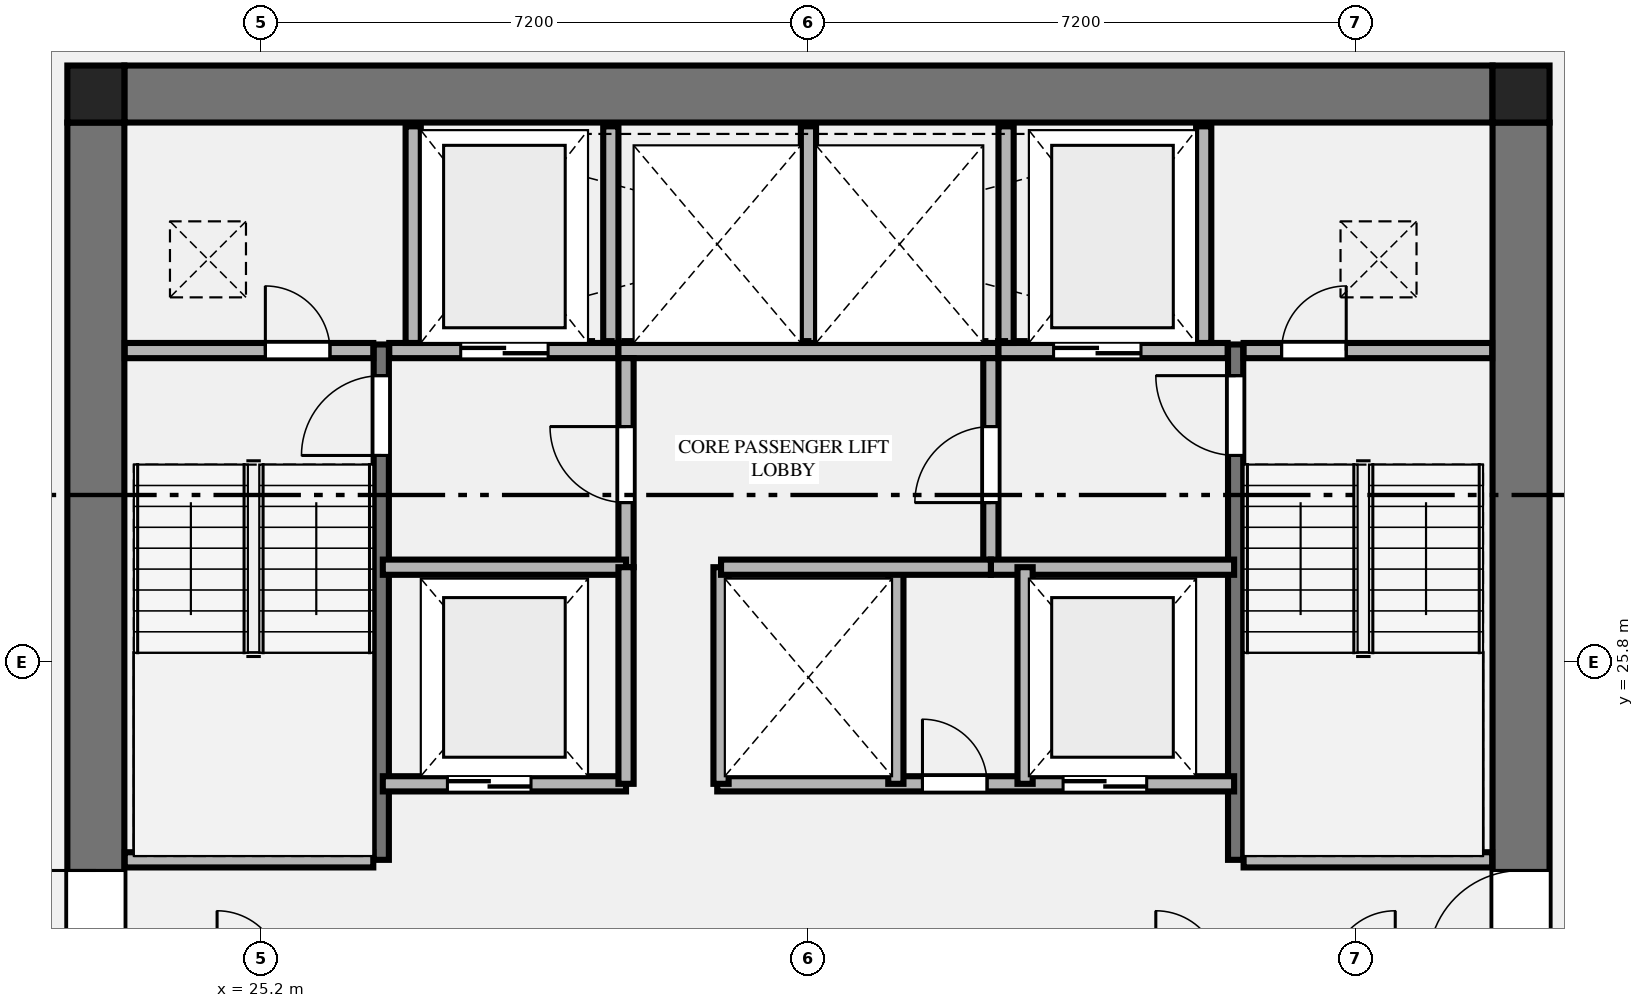
"""IFC4 building model, lengths in metres.
Left out: names, types, materials, properties, quantities, classifications, styles, units other than length and angle.
Written with IfcOpenShell. Run it as: python <this file> out.ifc"""

import sys

from ifc_helpers import new_model, si_unit, direction, frame, frame_2d, origin, origin_2d, place, context, subcontext, project, spatial, rectangle, extrude, element, fill, save


model = new_model("IFC4")
c1 = context("Model", 3, precision=1e-05, world=origin(), true_north=direction((0.0, 1.0)))
c2 = subcontext(c1, "Body", "Model", "MODEL_VIEW")
j1 = project(units=[si_unit("LENGTHUNIT", "METRE"), si_unit("PLANEANGLEUNIT", "RADIAN")], contexts=[c1])
p1 = place(None, origin())
s1 = spatial("IfcSite", under=j1, at=p1, CompositionType="ELEMENT")
p2 = place(p1, origin())
s2 = spatial("IfcBuilding", under=s1, at=p2, CompositionType="ELEMENT")
p3 = place(p2, frame((0.0, 0.0, 98.4)))
s3 = spatial("IfcBuildingStorey", under=s2, at=p3, CompositionType="ELEMENT", Elevation=98.4)
for number, where, z_axis, x_axis in (
    (1, (41.775, 33.275, 0.0), (0.0, 0.0, 1.0), (1.0, 0.0, 0.0)),
    (2, (23.025, 33.275, 0.0), (0.0, 0.0, 1.0), (1.0, 0.0, 0.0)),
):
    element("IfcColumn", number, at=place(p3, frame(where, z_axis=z_axis, x_axis=x_axis)), inside=s3, PredefinedType="COLUMN", context=c2, shape_type="SweptSolid", body=[
        extrude(rectangle(XDim=0.75, YDim=0.75, at=origin_2d()), origin(), (0.0, 0.0, 1.0), 3.55),
    ])
p4 = place(p3, frame((23.4, 33.275, 0.0), z_axis=(0.0, 0.0, 1.0), x_axis=(1.0, 0.0, 0.0)))
e3 = element("IfcWall", 3, at=p4, inside=s3, PredefinedType="SHEAR", context=c2, shape_type="SweptSolid", body=[
    extrude(rectangle(XDim=18.0, YDim=0.75, at=frame_2d((9.0, 0.0))), origin(), (0.0, 0.0, 1.0), 3.34),
])
p5 = place(p3, frame((23.025, 18.9, 0.0), z_axis=(0.0, 0.0, 1.0), x_axis=(0.0, 1.0, 0.0)))
e4 = element("IfcWall", 4, at=p5, inside=s3, PredefinedType="SHEAR", context=c2, shape_type="SweptSolid", body=[
    extrude(rectangle(XDim=14.0, YDim=0.75, at=frame_2d((7.0, 0.0))), origin(), (0.0, 0.0, 1.0), 3.34),
])
p6 = place(p5, frame((2.94, 0.0, 0.0)))
e5 = element("IfcOpeningElement", 5, at=p6, cuts=e4, PredefinedType="OPENING", context=c2, shape_type="SweptSolid", body=[
    extrude(rectangle(XDim=1.22, YDim=2.25, at=frame_2d((0.61, 1.125))), frame((0.0, 0.385, 0.0), z_axis=(0.0, -1.0, 0.0), x_axis=(1.0, 0.0, 0.0)), (0.0, 0.0, 1.0), 0.77),
])
p7 = place(p3, frame((41.775, 18.9, 0.0), z_axis=(0.0, 0.0, 1.0), x_axis=(0.0, 1.0, 0.0)))
e6 = element("IfcWall", 6, at=p7, inside=s3, PredefinedType="SHEAR", context=c2, shape_type="SweptSolid", body=[
    extrude(rectangle(XDim=14.0, YDim=0.75, at=frame_2d((7.0, 0.0))), origin(), (0.0, 0.0, 1.0), 3.34),
])
p8 = place(p7, frame((2.94, 0.0, 0.0)))
e7 = element("IfcOpeningElement", 7, at=p8, cuts=e6, PredefinedType="OPENING", context=c2, shape_type="SweptSolid", body=[
    extrude(rectangle(XDim=1.22, YDim=2.25, at=frame_2d((0.61, 1.125))), frame((0.0, 0.385, 0.0), z_axis=(0.0, -1.0, 0.0), x_axis=(1.0, 0.0, 0.0)), (0.0, 0.0, 1.0), 0.77),
])
p9 = place(p3, frame((26.78, 23.2, 0.0), z_axis=(0.0, 0.0, 1.0), x_axis=(0.0, 1.0, 0.0)))
e8 = element("IfcWall", 8, at=p9, inside=s3, PredefinedType="SHEAR", context=c2, shape_type="SweptSolid", body=[
    extrude(rectangle(XDim=6.78, YDim=0.2, at=frame_2d((3.39, 0.0))), origin(), (0.0, 0.0, 1.0), 3.55),
])
p10 = place(p9, frame((5.32, 0.0, 0.0)))
e9 = element("IfcOpeningElement", 9, at=p10, cuts=e8, PredefinedType="OPENING", context=c2, shape_type="SweptSolid", body=[
    extrude(rectangle(XDim=1.05, YDim=2.15, at=frame_2d((0.525, 1.075))), frame((0.0, 0.11, 0.0), z_axis=(0.0, -1.0, 0.0), x_axis=(1.0, 0.0, 0.0)), (0.0, 0.0, 1.0), 0.22),
])
p11 = place(p3, frame((23.405, 23.2, 0.0), z_axis=(0.0, 0.0, 1.0), x_axis=(1.0, 0.0, 0.0)))
e10 = element("IfcWall", 10, at=p11, inside=s3, PredefinedType="PLUMBINGWALL", context=c2, shape_type="SweptSolid", body=[
    extrude(rectangle(XDim=3.27, YDim=0.2, at=frame_2d((1.635, 0.0))), origin(), (0.0, 0.0, 1.0), 3.34),
])
p12 = place(p3, frame((38.02, 23.2, 0.0), z_axis=(0.0, 0.0, 1.0), x_axis=(0.0, 1.0, 0.0)))
e11 = element("IfcWall", 11, at=p12, inside=s3, PredefinedType="SHEAR", context=c2, shape_type="SweptSolid", body=[
    extrude(rectangle(XDim=6.78, YDim=0.2, at=frame_2d((3.39, 0.0))), origin(), (0.0, 0.0, 1.0), 3.55),
])
p13 = place(p12, frame((5.32, 0.0, 0.0)))
e12 = element("IfcOpeningElement", 12, at=p13, cuts=e11, PredefinedType="OPENING", context=c2, shape_type="SweptSolid", body=[
    extrude(rectangle(XDim=1.05, YDim=2.15, at=frame_2d((0.525, 1.075))), frame((0.0, 0.11, 0.0), z_axis=(0.0, -1.0, 0.0), x_axis=(1.0, 0.0, 0.0)), (0.0, 0.0, 1.0), 0.22),
])
p14 = place(p3, frame((38.125, 23.2, 0.0), z_axis=(0.0, 0.0, 1.0), x_axis=(1.0, 0.0, 0.0)))
e13 = element("IfcWall", 13, at=p14, inside=s3, PredefinedType="PLUMBINGWALL", context=c2, shape_type="SweptSolid", body=[
    extrude(rectangle(XDim=3.27, YDim=0.2, at=frame_2d((1.635, 0.0))), origin(), (0.0, 0.0, 1.0), 3.34),
])
p15 = place(p3, frame((23.405, 29.9, 0.0), z_axis=(0.0, 0.0, 1.0), x_axis=(1.0, 0.0, 0.0)))
e14 = element("IfcWall", 14, at=p15, inside=s3, PredefinedType="PLUMBINGWALL", context=c2, shape_type="SweptSolid", body=[
    extrude(rectangle(XDim=3.27, YDim=0.2, at=frame_2d((1.635, 0.0))), origin(), (0.0, 0.0, 1.0), 3.34),
])
p16 = place(p15, frame((1.85, 0.0, 0.0)))
e15 = element("IfcOpeningElement", 15, at=p16, cuts=e14, PredefinedType="OPENING", context=c2, shape_type="SweptSolid", body=[
    extrude(rectangle(XDim=0.85, YDim=2.05, at=frame_2d((0.425, 1.025))), frame((0.0, 0.11, 0.0), z_axis=(0.0, -1.0, 0.0), x_axis=(1.0, 0.0, 0.0)), (0.0, 0.0, 1.0), 0.22),
])
p17 = place(p3, frame((26.885, 29.9, 0.0), z_axis=(0.0, 0.0, 1.0), x_axis=(1.0, 0.0, 0.0)))
e16 = element("IfcWall", 16, at=p17, inside=s3, PredefinedType="PLUMBINGWALL", context=c2, shape_type="SweptSolid", body=[
    extrude(rectangle(XDim=3.015, YDim=0.2, at=frame_2d((1.507, 0.0))), origin(), (0.0, 0.0, 1.0), 3.34),
])
p18 = place(p17, frame((0.94, 0.0, 0.0)))
e17 = element("IfcOpeningElement", 17, at=p18, cuts=e16, PredefinedType="OPENING", context=c2, shape_type="SweptSolid", body=[
    extrude(rectangle(XDim=1.15, YDim=2.2, at=frame_2d((0.575, 1.1))), frame((0.0, 0.11, 0.0), z_axis=(0.0, -1.0, 0.0), x_axis=(1.0, 0.0, 0.0)), (0.0, 0.0, 1.0), 0.22),
])
p19 = place(p3, frame((29.9, 29.9, 0.0), z_axis=(0.0, 0.0, 1.0), x_axis=(1.0, 0.0, 0.0)))
e18 = element("IfcWall", 18, at=p19, inside=s3, PredefinedType="PLUMBINGWALL", context=c2, shape_type="SweptSolid", body=[
    extrude(rectangle(XDim=5.0, YDim=0.2, at=frame_2d((2.5, 0.0))), origin(), (0.0, 0.0, 1.0), 3.34),
])
p20 = place(p3, frame((34.9, 29.9, 0.0), z_axis=(0.0, 0.0, 1.0), x_axis=(1.0, 0.0, 0.0)))
e19 = element("IfcWall", 19, at=p20, inside=s3, PredefinedType="PLUMBINGWALL", context=c2, shape_type="SweptSolid", body=[
    extrude(rectangle(XDim=3.015, YDim=0.2, at=frame_2d((1.508, 0.0))), origin(), (0.0, 0.0, 1.0), 3.34),
])
p21 = place(p20, frame((0.725, 0.0, 0.0)))
e20 = element("IfcOpeningElement", 20, at=p21, cuts=e19, PredefinedType="OPENING", context=c2, shape_type="SweptSolid", body=[
    extrude(rectangle(XDim=1.15, YDim=2.2, at=frame_2d((0.575, 1.1))), frame((0.0, 0.11, 0.0), z_axis=(0.0, -1.0, 0.0), x_axis=(1.0, 0.0, 0.0)), (0.0, 0.0, 1.0), 0.22),
])
p22 = place(p3, frame((38.125, 29.9, 0.0), z_axis=(0.0, 0.0, 1.0), x_axis=(1.0, 0.0, 0.0)))
e21 = element("IfcWall", 21, at=p22, inside=s3, PredefinedType="PLUMBINGWALL", context=c2, shape_type="SweptSolid", body=[
    extrude(rectangle(XDim=3.27, YDim=0.2, at=frame_2d((1.635, 0.0))), origin(), (0.0, 0.0, 1.0), 3.34),
])
p23 = place(p22, frame((0.5, 0.0, 0.0)))
e22 = element("IfcOpeningElement", 22, at=p23, cuts=e21, PredefinedType="OPENING", context=c2, shape_type="SweptSolid", body=[
    extrude(rectangle(XDim=0.85, YDim=2.05, at=frame_2d((0.425, 1.025))), frame((0.0, 0.11, 0.0), z_axis=(0.0, -1.0, 0.0), x_axis=(1.0, 0.0, 0.0)), (0.0, 0.0, 1.0), 0.22),
])
for number, where, z_axis, x_axis in (
    (23, (27.2, 30.0, 0.0), (0.0, 0.0, 1.0), (0.0, 1.0, 0.0)),
    (24, (29.8, 30.0, 0.0), (0.0, 0.0, 1.0), (0.0, 1.0, 0.0)),
    (25, (32.4, 30.0, 0.0), (0.0, 0.0, 1.0), (0.0, 1.0, 0.0)),
    (26, (35.0, 30.0, 0.0), (0.0, 0.0, 1.0), (0.0, 1.0, 0.0)),
    (27, (37.6, 30.0, 0.0), (0.0, 0.0, 1.0), (0.0, 1.0, 0.0)),
):
    element("IfcWall", number, at=place(p3, frame(where, z_axis=z_axis, x_axis=x_axis)), inside=s3, PredefinedType="PLUMBINGWALL", context=c2, shape_type="SweptSolid", body=[
        extrude(rectangle(XDim=2.85, YDim=0.2, at=frame_2d((1.425, 0.0))), origin(), (0.0, 0.0, 1.0), 3.34),
    ])
p24 = place(p3, frame((30.0, 27.05, 0.0), z_axis=(0.0, 0.0, 1.0), x_axis=(0.0, 1.0, 0.0)))
e28 = element("IfcWall", 28, at=p24, inside=s3, PredefinedType="PLUMBINGWALL", context=c2, shape_type="SweptSolid", body=[
    extrude(rectangle(XDim=2.75, YDim=0.2, at=frame_2d((1.375, 0.0))), origin(), (0.0, 0.0, 1.0), 3.34),
])
p25 = place(p24, frame((0.85, 0.0, 0.0)))
e29 = element("IfcOpeningElement", 29, at=p25, cuts=e28, PredefinedType="OPENING", context=c2, shape_type="SweptSolid", body=[
    extrude(rectangle(XDim=1.0, YDim=2.15, at=frame_2d((0.5, 1.075))), frame((0.0, 0.11, 0.0), z_axis=(0.0, -1.0, 0.0), x_axis=(1.0, 0.0, 0.0)), (0.0, 0.0, 1.0), 0.22),
])
p26 = place(p3, frame((26.8, 27.05, 0.0), z_axis=(0.0, 0.0, 1.0), x_axis=(1.0, 0.0, 0.0)))
e30 = element("IfcWall", 30, at=p26, inside=s3, PredefinedType="PLUMBINGWALL", context=c2, shape_type="SweptSolid", body=[
    extrude(rectangle(XDim=3.2, YDim=0.2, at=frame_2d((1.6, 0.0))), origin(), (0.0, 0.0, 1.0), 3.34),
])
p27 = place(p3, frame((34.8, 27.05, 0.0), z_axis=(0.0, 0.0, 1.0), x_axis=(0.0, 1.0, 0.0)))
e31 = element("IfcWall", 31, at=p27, inside=s3, PredefinedType="PLUMBINGWALL", context=c2, shape_type="SweptSolid", body=[
    extrude(rectangle(XDim=2.75, YDim=0.2, at=frame_2d((1.375, 0.0))), origin(), (0.0, 0.0, 1.0), 3.34),
])
p28 = place(p27, frame((0.85, 0.0, 0.0)))
e32 = element("IfcOpeningElement", 32, at=p28, cuts=e31, PredefinedType="OPENING", context=c2, shape_type="SweptSolid", body=[
    extrude(rectangle(XDim=1.0, YDim=2.15, at=frame_2d((0.5, 1.075))), frame((0.0, 0.11, 0.0), z_axis=(0.0, -1.0, 0.0), x_axis=(1.0, 0.0, 0.0)), (0.0, 0.0, 1.0), 0.22),
])
p29 = place(p3, frame((34.8, 27.05, 0.0), z_axis=(0.0, 0.0, 1.0), x_axis=(1.0, 0.0, 0.0)))
e33 = element("IfcWall", 33, at=p29, inside=s3, PredefinedType="PLUMBINGWALL", context=c2, shape_type="SweptSolid", body=[
    extrude(rectangle(XDim=3.2, YDim=0.2, at=frame_2d((1.6, 0.0))), origin(), (0.0, 0.0, 1.0), 3.34),
])
p30 = place(p3, frame((26.8, 24.2, 0.0), z_axis=(0.0, 0.0, 1.0), x_axis=(1.0, 0.0, 0.0)))
e34 = element("IfcWall", 34, at=p30, inside=s3, PredefinedType="PLUMBINGWALL", context=c2, shape_type="SweptSolid", body=[
    extrude(rectangle(XDim=3.2, YDim=0.2, at=frame_2d((1.6, 0.0))), origin(), (0.0, 0.0, 1.0), 3.34),
])
p31 = place(p30, frame((0.85, 0.0, 0.0)))
e35 = element("IfcOpeningElement", 35, at=p31, cuts=e34, PredefinedType="OPENING", context=c2, shape_type="SweptSolid", body=[
    extrude(rectangle(XDim=1.1, YDim=2.2, at=frame_2d((0.55, 1.1))), frame((0.0, 0.11, 0.0), z_axis=(0.0, -1.0, 0.0), x_axis=(1.0, 0.0, 0.0)), (0.0, 0.0, 1.0), 0.22),
])
p32 = place(p3, frame((30.0, 24.2, 0.0), z_axis=(0.0, 0.0, 1.0), x_axis=(0.0, 1.0, 0.0)))
e36 = element("IfcWall", 36, at=p32, inside=s3, PredefinedType="PLUMBINGWALL", context=c2, shape_type="SweptSolid", body=[
    extrude(rectangle(XDim=2.85, YDim=0.2, at=frame_2d((1.425, 0.0))), origin(), (0.0, 0.0, 1.0), 3.34),
])
p33 = place(p3, frame((31.2, 24.2, 0.0), z_axis=(0.0, 0.0, 1.0), x_axis=(1.0, 0.0, 0.0)))
e37 = element("IfcWall", 37, at=p33, inside=s3, PredefinedType="PLUMBINGWALL", context=c2, shape_type="SweptSolid", body=[
    extrude(rectangle(XDim=6.8, YDim=0.2, at=frame_2d((3.4, 0.0))), origin(), (0.0, 0.0, 1.0), 3.34),
])
p34 = place(p33, frame((2.7, 0.0, 0.0)))
e38 = element("IfcOpeningElement", 38, at=p34, cuts=e37, PredefinedType="OPENING", context=c2, shape_type="SweptSolid", body=[
    extrude(rectangle(XDim=0.85, YDim=2.05, at=frame_2d((0.425, 1.025))), frame((0.0, 0.11, 0.0), z_axis=(0.0, -1.0, 0.0), x_axis=(1.0, 0.0, 0.0)), (0.0, 0.0, 1.0), 0.22),
])
p35 = place(p33, frame((4.55, 0.0, 0.0)))
e39 = element("IfcOpeningElement", 39, at=p35, cuts=e37, PredefinedType="OPENING", context=c2, shape_type="SweptSolid", body=[
    extrude(rectangle(XDim=1.1, YDim=2.2, at=frame_2d((0.55, 1.1))), frame((0.0, 0.11, 0.0), z_axis=(0.0, -1.0, 0.0), x_axis=(1.0, 0.0, 0.0)), (0.0, 0.0, 1.0), 0.22),
])
for number, where, z_axis, x_axis in (
    (40, (31.25, 24.2, 0.0), (0.0, 0.0, 1.0), (0.0, 1.0, 0.0)),
    (41, (33.55, 24.2, 0.0), (0.0, 0.0, 1.0), (0.0, 1.0, 0.0)),
    (42, (35.25, 24.2, 0.0), (0.0, 0.0, 1.0), (0.0, 1.0, 0.0)),
):
    element("IfcWall", number, at=place(p3, frame(where, z_axis=z_axis, x_axis=x_axis)), inside=s3, PredefinedType="PLUMBINGWALL", context=c2, shape_type="SweptSolid", body=[
        extrude(rectangle(XDim=2.85, YDim=0.2, at=frame_2d((1.425, 0.0))), origin(), (0.0, 0.0, 1.0), 3.34),
    ])
p36 = place(p3, frame((31.25, 27.05, 0.0), z_axis=(0.0, 0.0, 1.0), x_axis=(1.0, 0.0, 0.0)))
e43 = element("IfcWall", 43, at=p36, inside=s3, PredefinedType="PLUMBINGWALL", context=c2, shape_type="SweptSolid", body=[
    extrude(rectangle(XDim=3.55, YDim=0.2, at=frame_2d((1.775, 0.0))), origin(), (0.0, 0.0, 1.0), 3.34),
])
p37 = place(p6, origin())
e44 = element("IfcDoor", 44, at=p37, inside=s3, OperationType="SINGLE_SWING_RIGHT", PredefinedType="DOOR", context=c2, shape_type="SweptSolid", body=[
    extrude(rectangle(XDim=1.22, YDim=2.25, at=frame_2d((0.61, 1.125))), frame((0.0, 0.025, 0.0), z_axis=(0.0, -1.0, 0.0), x_axis=(1.0, 0.0, 0.0)), (0.0, 0.0, 1.0), 0.05),
])
fill(e5, e44)
p38 = place(p8, origin())
e45 = element("IfcDoor", 45, at=p38, inside=s3, OperationType="SINGLE_SWING_LEFT", PredefinedType="DOOR", context=c2, shape_type="SweptSolid", body=[
    extrude(rectangle(XDim=1.22, YDim=2.25, at=frame_2d((0.61, 1.125))), frame((0.0, 0.025, 0.0), z_axis=(0.0, -1.0, 0.0), x_axis=(1.0, 0.0, 0.0)), (0.0, 0.0, 1.0), 0.05),
])
fill(e7, e45)
p39 = place(p10, origin())
e46 = element("IfcDoor", 46, at=p39, inside=s3, OperationType="SINGLE_SWING_LEFT", PredefinedType="DOOR", context=c2, shape_type="SweptSolid", body=[
    extrude(rectangle(XDim=1.05, YDim=2.15, at=frame_2d((0.525, 1.075))), frame((0.0, 0.025, 0.0), z_axis=(0.0, -1.0, 0.0), x_axis=(1.0, 0.0, 0.0)), (0.0, 0.0, 1.0), 0.05),
])
fill(e9, e46)
p40 = place(p13, origin())
e47 = element("IfcDoor", 47, at=p40, inside=s3, OperationType="SINGLE_SWING_RIGHT", PredefinedType="DOOR", context=c2, shape_type="SweptSolid", body=[
    extrude(rectangle(XDim=1.05, YDim=2.15, at=frame_2d((0.525, 1.075))), frame((0.0, 0.025, 0.0), z_axis=(0.0, -1.0, 0.0), x_axis=(1.0, 0.0, 0.0)), (0.0, 0.0, 1.0), 0.05),
])
fill(e12, e47)
p41 = place(p16, origin())
e48 = element("IfcDoor", 48, at=p41, inside=s3, OperationType="SINGLE_SWING_LEFT", PredefinedType="DOOR", context=c2, shape_type="SweptSolid", body=[
    extrude(rectangle(XDim=0.85, YDim=2.05, at=frame_2d((0.425, 1.025))), frame((0.0, 0.025, 0.0), z_axis=(0.0, -1.0, 0.0), x_axis=(1.0, 0.0, 0.0)), (0.0, 0.0, 1.0), 0.05),
])
fill(e15, e48)
p42 = place(p23, origin())
e49 = element("IfcDoor", 49, at=p42, inside=s3, OperationType="SINGLE_SWING_RIGHT", PredefinedType="DOOR", context=c2, shape_type="SweptSolid", body=[
    extrude(rectangle(XDim=0.85, YDim=2.05, at=frame_2d((0.425, 1.025))), frame((0.0, 0.025, 0.0), z_axis=(0.0, -1.0, 0.0), x_axis=(1.0, 0.0, 0.0)), (0.0, 0.0, 1.0), 0.05),
])
fill(e22, e49)
p43 = place(p18, origin())
e50 = element("IfcDoor", 50, at=p43, inside=s3, OperationType="DOUBLE_DOOR_SLIDING", PredefinedType="DOOR", context=c2, shape_type="SweptSolid", body=[
    extrude(rectangle(XDim=1.15, YDim=2.2, at=frame_2d((0.575, 1.1))), frame((0.0, 0.025, 0.0), z_axis=(0.0, -1.0, 0.0), x_axis=(1.0, 0.0, 0.0)), (0.0, 0.0, 1.0), 0.05),
])
fill(e17, e50)
p44 = place(p21, origin())
e51 = element("IfcDoor", 51, at=p44, inside=s3, OperationType="DOUBLE_DOOR_SLIDING", PredefinedType="DOOR", context=c2, shape_type="SweptSolid", body=[
    extrude(rectangle(XDim=1.15, YDim=2.2, at=frame_2d((0.575, 1.1))), frame((0.0, 0.025, 0.0), z_axis=(0.0, -1.0, 0.0), x_axis=(1.0, 0.0, 0.0)), (0.0, 0.0, 1.0), 0.05),
])
fill(e20, e51)
p45 = place(p25, origin())
e52 = element("IfcDoor", 52, at=p45, inside=s3, OperationType="SINGLE_SWING_RIGHT", PredefinedType="DOOR", context=c2, shape_type="SweptSolid", body=[
    extrude(rectangle(XDim=1.0, YDim=2.15, at=frame_2d((0.5, 1.075))), frame((0.0, 0.025, 0.0), z_axis=(0.0, -1.0, 0.0), x_axis=(1.0, 0.0, 0.0)), (0.0, 0.0, 1.0), 0.05),
])
fill(e29, e52)
p46 = place(p28, origin())
e53 = element("IfcDoor", 53, at=p46, inside=s3, OperationType="SINGLE_SWING_LEFT", PredefinedType="DOOR", context=c2, shape_type="SweptSolid", body=[
    extrude(rectangle(XDim=1.0, YDim=2.15, at=frame_2d((0.5, 1.075))), frame((0.0, 0.025, 0.0), z_axis=(0.0, -1.0, 0.0), x_axis=(1.0, 0.0, 0.0)), (0.0, 0.0, 1.0), 0.05),
])
fill(e32, e53)
p47 = place(p31, origin())
e54 = element("IfcDoor", 54, at=p47, inside=s3, OperationType="DOUBLE_DOOR_SLIDING", PredefinedType="DOOR", context=c2, shape_type="SweptSolid", body=[
    extrude(rectangle(XDim=1.1, YDim=2.2, at=frame_2d((0.55, 1.1))), frame((0.0, 0.025, 0.0), z_axis=(0.0, -1.0, 0.0), x_axis=(1.0, 0.0, 0.0)), (0.0, 0.0, 1.0), 0.05),
])
fill(e35, e54)
p48 = place(p34, origin())
e55 = element("IfcDoor", 55, at=p48, inside=s3, OperationType="SINGLE_SWING_LEFT", PredefinedType="DOOR", context=c2, shape_type="SweptSolid", body=[
    extrude(rectangle(XDim=0.85, YDim=2.05, at=frame_2d((0.425, 1.025))), frame((0.0, 0.025, 0.0), z_axis=(0.0, -1.0, 0.0), x_axis=(1.0, 0.0, 0.0)), (0.0, 0.0, 1.0), 0.05),
])
fill(e38, e55)
p49 = place(p35, origin())
e56 = element("IfcDoor", 56, at=p49, inside=s3, OperationType="DOUBLE_DOOR_SLIDING", PredefinedType="DOOR", context=c2, shape_type="SweptSolid", body=[
    extrude(rectangle(XDim=1.1, YDim=2.2, at=frame_2d((0.55, 1.1))), frame((0.0, 0.025, 0.0), z_axis=(0.0, -1.0, 0.0), x_axis=(1.0, 0.0, 0.0)), (0.0, 0.0, 1.0), 0.05),
])
fill(e39, e56)
save(model, sys.argv[1])
